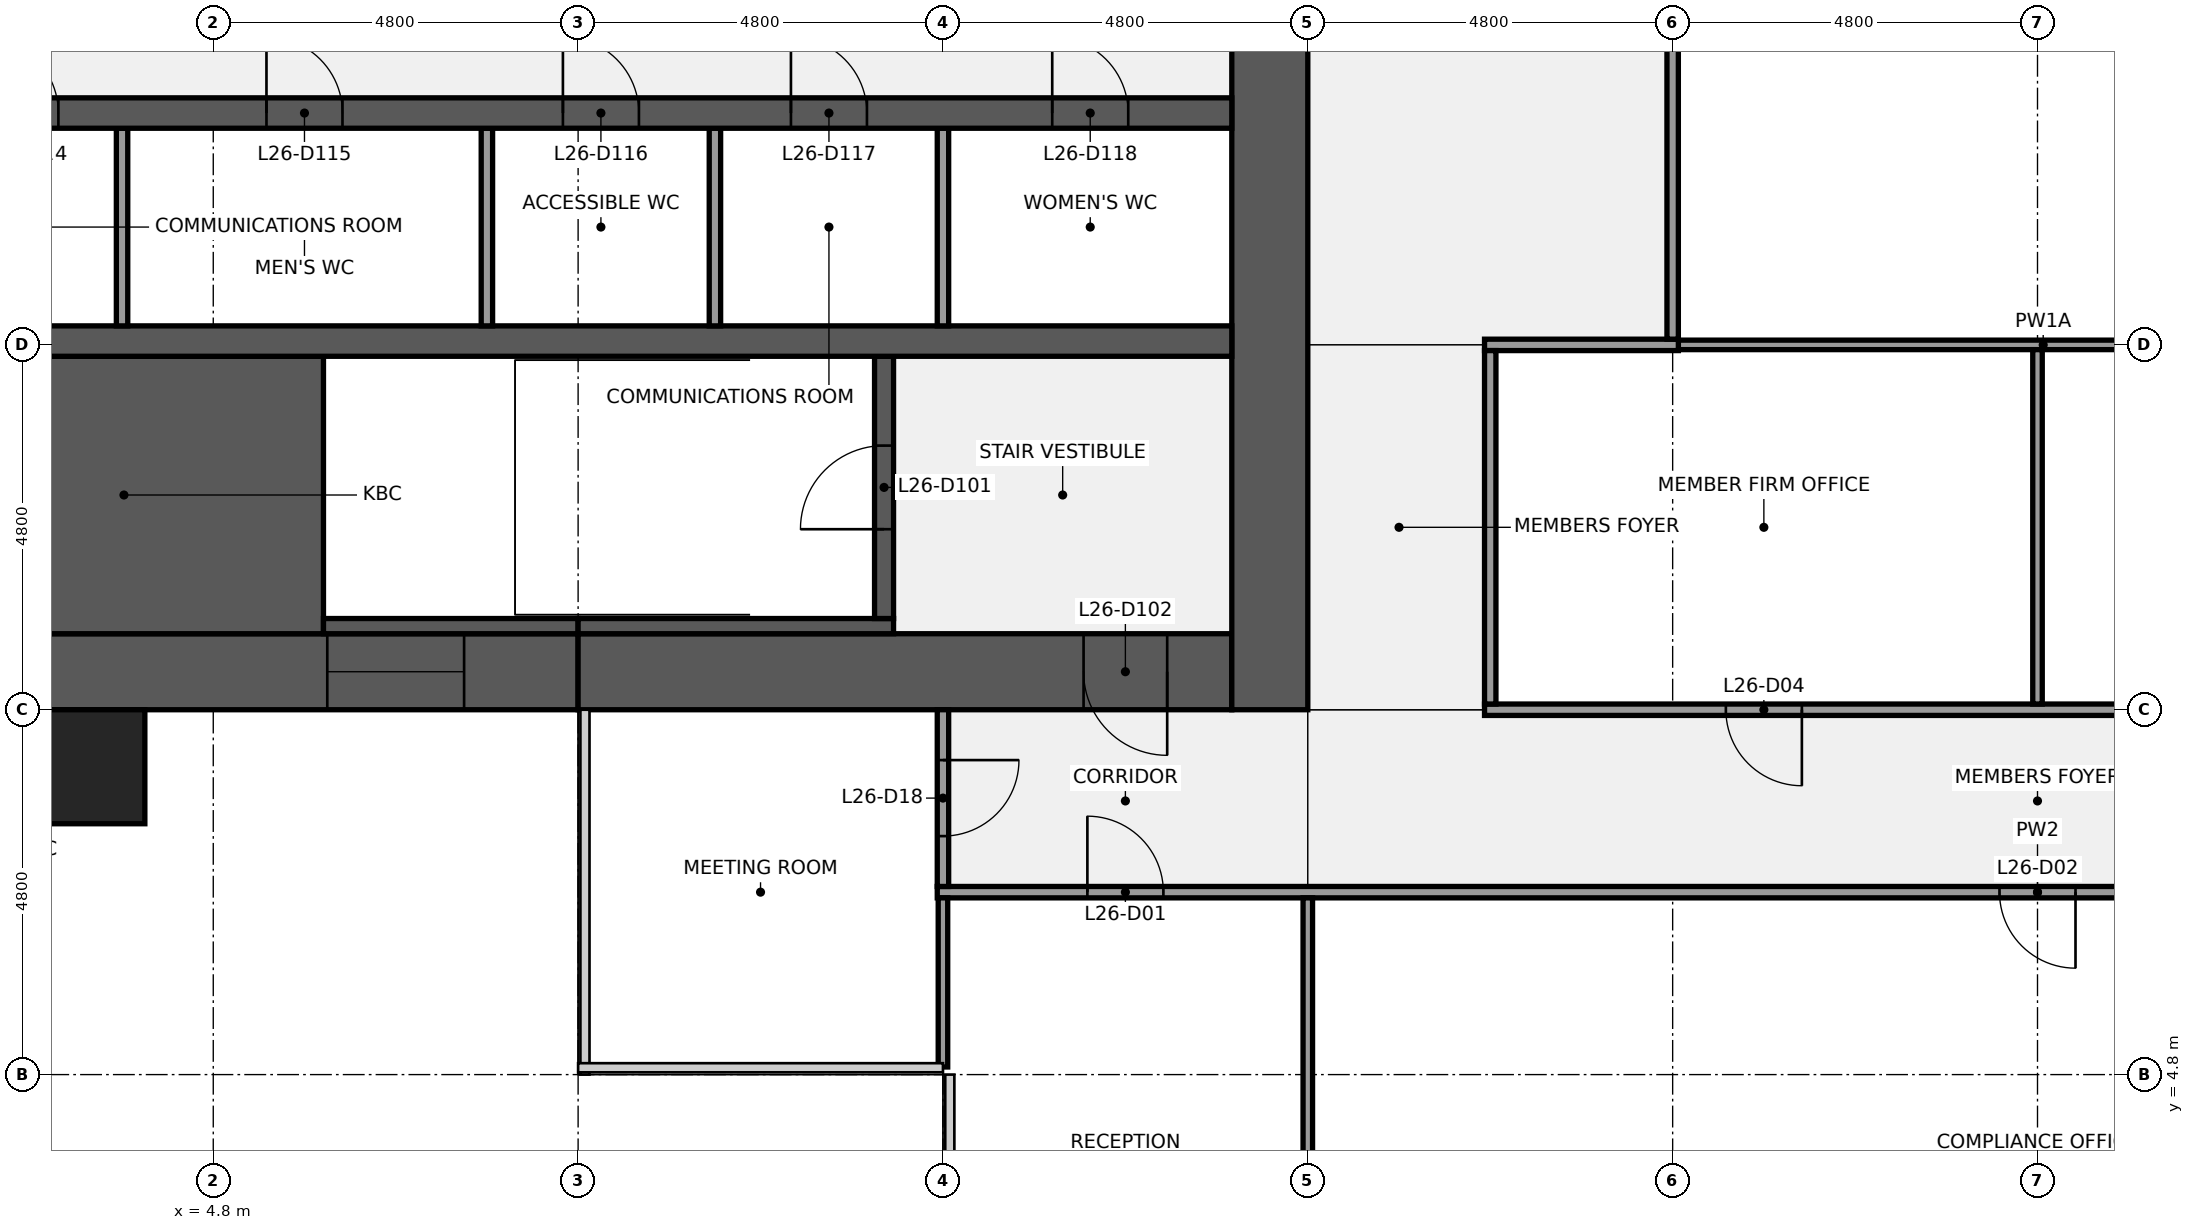
"""IFC4 building model, lengths in metres.
Left out: names, types, materials, properties, quantities, classifications, styles, units other than length and angle.
Written with IfcOpenShell. Run it as: python <this file> out.ifc"""

import sys

from ifc_helpers import new_model, si_unit, direction, frame, frame_2d, origin, origin_2d, place, context, subcontext, project, spatial, rectangle, extrude, element, fill, save


model = new_model("IFC4")
c1 = context("Model", 3, precision=1e-05, world=origin(), true_north=direction((0.0, 1.0)))
c2 = subcontext(c1, "Body", "Model", "MODEL_VIEW")
j1 = project(units=[si_unit("LENGTHUNIT", "METRE"), si_unit("PLANEANGLEUNIT", "RADIAN")], contexts=[c1])
p1 = place(None, origin())
s1 = spatial("IfcSite", under=j1, at=p1, CompositionType="ELEMENT")
p2 = place(p1, origin())
s2 = spatial("IfcBuilding", under=s1, at=p2, CompositionType="ELEMENT")
p3 = place(p2, frame((0.0, 0.0, 124.1)))
s3 = spatial("IfcBuildingStorey", under=s2, at=p3, CompositionType="ELEMENT", Elevation=124.1)
p4 = place(p3, frame((9.6, 10.1, 0.0), z_axis=(0.0, 0.0, 1.0), x_axis=(-1.0, 0.0, 0.0)))
e1 = element("IfcWall", 1, at=p4, inside=s3, PredefinedType="SHEAR", context=c2, shape_type="SweptSolid", body=[
    extrude(rectangle(XDim=8.6, YDim=1.0, at=frame_2d((4.3, 0.0))), origin(), (0.0, 0.0, 1.0), 3.84),
])
p5 = place(p4, frame((1.5, 0.0, 0.9)))
e2 = element("IfcOpeningElement", 2, at=p5, cuts=e1, PredefinedType="OPENING", context=c2, shape_type="SweptSolid", body=[
    extrude(rectangle(XDim=1.8, YDim=1.5, at=frame_2d((0.9, 0.75))), frame((0.0, 0.51, 0.0), z_axis=(0.0, -1.0, 0.0), x_axis=(1.0, 0.0, 0.0)), (0.0, 0.0, 1.0), 1.02),
])
p6 = place(p3, frame((18.2, 10.1, 0.0), z_axis=(0.0, 0.0, 1.0), x_axis=(-1.0, 0.0, 0.0)))
e3 = element("IfcWall", 3, at=p6, inside=s3, PredefinedType="SHEAR", context=c2, shape_type="SweptSolid", body=[
    extrude(rectangle(XDim=8.6, YDim=1.0, at=frame_2d((4.3, 0.0))), origin(), (0.0, 0.0, 1.0), 3.84),
])
p7 = place(p6, frame((0.85, 0.0, 0.0)))
e4 = element("IfcOpeningElement", 4, at=p7, cuts=e3, PredefinedType="OPENING", context=c2, shape_type="SweptSolid", body=[
    extrude(rectangle(XDim=1.1, YDim=2.1, at=frame_2d((0.55, 1.05))), frame((0.0, 0.51, 0.0), z_axis=(0.0, -1.0, 0.0), x_axis=(1.0, 0.0, 0.0)), (0.0, 0.0, 1.0), 1.02),
])
p8 = place(p3, frame((18.7, 38.4, 0.0), z_axis=(0.0, 0.0, 1.0), x_axis=(0.0, -1.0, 0.0)))
e5 = element("IfcWall", 5, at=p8, inside=s3, PredefinedType="SHEAR", context=c2, shape_type="SweptSolid", body=[
    extrude(rectangle(XDim=28.8, YDim=1.0, at=frame_2d((14.4, 0.0))), origin(), (0.0, 0.0, 1.0), 3.84),
])
p9 = place(p8, frame((18.3, 0.0, 0.0)))
e6 = element("IfcOpeningElement", 6, at=p9, cuts=e5, PredefinedType="OPENING", context=c2, shape_type="SweptSolid", body=[
    extrude(rectangle(XDim=1.8, YDim=2.1, at=frame_2d((0.9, 1.05))), frame((0.0, 0.51, 0.0), z_axis=(0.0, -1.0, 0.0), x_axis=(1.0, 0.0, 0.0)), (0.0, 0.0, 1.0), 1.02),
])
p10 = place(p8, frame((8.7, 0.0, 0.0)))
e7 = element("IfcOpeningElement", 7, at=p10, cuts=e5, PredefinedType="OPENING", context=c2, shape_type="SweptSolid", body=[
    extrude(rectangle(XDim=1.8, YDim=2.1, at=frame_2d((0.9, 1.05))), frame((0.0, 0.51, 0.0), z_axis=(0.0, -1.0, 0.0), x_axis=(1.0, 0.0, 0.0)), (0.0, 0.0, 1.0), 1.02),
])
p11 = place(p3, frame((1.0, 12.425, 0.0), z_axis=(0.0, 0.0, 1.0), x_axis=(1.0, 0.0, 0.0)))
e8 = element("IfcWall", 8, at=p11, inside=s3, PredefinedType="SHEAR", context=c2, shape_type="SweptSolid", body=[
    extrude(rectangle(XDim=5.25, YDim=3.65, at=frame_2d((2.625, 0.0))), origin(), (0.0, 0.0, 1.0), 3.84),
])
p12 = place(p3, frame((6.25, 10.7, 0.0), z_axis=(0.0, 0.0, 1.0), x_axis=(1.0, 0.0, 0.0)))
e9 = element("IfcWall", 9, at=p12, inside=s3, PredefinedType="SHEAR", context=c2, shape_type="SweptSolid", body=[
    extrude(rectangle(XDim=3.35, YDim=0.2, at=frame_2d((1.675, 0.0))), origin(), (0.0, 0.0, 1.0), 3.84),
])
p13 = place(p3, frame((9.6, 10.7, 0.0), z_axis=(0.0, 0.0, 1.0), x_axis=(1.0, 0.0, 0.0)))
e10 = element("IfcWall", 10, at=p13, inside=s3, PredefinedType="SHEAR", context=c2, shape_type="SweptSolid", body=[
    extrude(rectangle(XDim=4.15, YDim=0.2, at=frame_2d((2.075, 0.0))), origin(), (0.0, 0.0, 1.0), 3.84),
])
p14 = place(p3, frame((13.625, 10.8, 0.0), z_axis=(0.0, 0.0, 1.0), x_axis=(0.0, 1.0, 0.0)))
e11 = element("IfcWall", 11, at=p14, inside=s3, PredefinedType="SHEAR", context=c2, shape_type="SweptSolid", body=[
    extrude(rectangle(XDim=3.45, YDim=0.25, at=frame_2d((1.725, 0.0))), origin(), (0.0, 0.0, 1.0), 3.84),
])
p15 = place(p14, frame((1.175, 0.0, 0.0)))
e12 = element("IfcOpeningElement", 12, at=p15, cuts=e11, PredefinedType="OPENING", context=c2, shape_type="SweptSolid", body=[
    extrude(rectangle(XDim=1.1, YDim=2.1, at=frame_2d((0.55, 1.05))), frame((0.0, 0.135, 0.0), z_axis=(0.0, -1.0, 0.0), x_axis=(1.0, 0.0, 0.0)), (0.0, 0.0, 1.0), 0.27),
])
p16 = place(p3, frame((1.0, 14.45, 0.0), z_axis=(0.0, 0.0, 1.0), x_axis=(1.0, 0.0, 0.0)))
e13 = element("IfcWall", 13, at=p16, inside=s3, PredefinedType="SHEAR", context=c2, shape_type="SweptSolid", body=[
    extrude(rectangle(XDim=17.2, YDim=0.4, at=frame_2d((8.6, 0.0))), origin(), (0.0, 0.0, 1.0), 3.84),
])
for number, where, z_axis, x_axis in (
    (14, (3.6, 14.65, 0.0), (0.0, 0.0, 1.0), (0.0, 1.0, 0.0)),
    (15, (8.4, 14.65, 0.0), (0.0, 0.0, 1.0), (0.0, 1.0, 0.0)),
    (16, (11.4, 14.65, 0.0), (0.0, 0.0, 1.0), (0.0, 1.0, 0.0)),
    (17, (14.4, 14.65, 0.0), (0.0, 0.0, 1.0), (0.0, 1.0, 0.0)),
):
    element("IfcWall", number, at=place(p3, frame(where, z_axis=z_axis, x_axis=x_axis)), inside=s3, PredefinedType="PARTITIONING", context=c2, shape_type="SweptSolid", body=[
        extrude(rectangle(XDim=2.6, YDim=0.15, at=frame_2d((1.3, 0.0))), origin(), (0.0, 0.0, 1.0), 3.84),
    ])
p17 = place(p3, frame((1.0, 17.45, 0.0), z_axis=(0.0, 0.0, 1.0), x_axis=(1.0, 0.0, 0.0)))
e18 = element("IfcWall", 18, at=p17, inside=s3, PredefinedType="SHEAR", context=c2, shape_type="SweptSolid", body=[
    extrude(rectangle(XDim=17.2, YDim=0.4, at=frame_2d((8.6, 0.0))), origin(), (0.0, 0.0, 1.0), 3.84),
])
p18 = place(p17, frame((0.762, 0.0, 0.0)))
e19 = element("IfcOpeningElement", 19, at=p18, cuts=e18, PredefinedType="OPENING", context=c2, shape_type="SweptSolid", body=[
    extrude(rectangle(XDim=1.0, YDim=2.1, at=frame_2d((0.5, 1.05))), frame((0.0, 0.21, 0.0), z_axis=(0.0, -1.0, 0.0), x_axis=(1.0, 0.0, 0.0)), (0.0, 0.0, 1.0), 0.42),
])
p19 = place(p17, frame((4.5, 0.0, 0.0)))
e20 = element("IfcOpeningElement", 20, at=p19, cuts=e18, PredefinedType="OPENING", context=c2, shape_type="SweptSolid", body=[
    extrude(rectangle(XDim=1.0, YDim=2.1, at=frame_2d((0.5, 1.05))), frame((0.0, 0.21, 0.0), z_axis=(0.0, -1.0, 0.0), x_axis=(1.0, 0.0, 0.0)), (0.0, 0.0, 1.0), 0.42),
])
p20 = place(p17, frame((8.4, 0.0, 0.0)))
e21 = element("IfcOpeningElement", 21, at=p20, cuts=e18, PredefinedType="OPENING", context=c2, shape_type="SweptSolid", body=[
    extrude(rectangle(XDim=1.0, YDim=2.1, at=frame_2d((0.5, 1.05))), frame((0.0, 0.21, 0.0), z_axis=(0.0, -1.0, 0.0), x_axis=(1.0, 0.0, 0.0)), (0.0, 0.0, 1.0), 0.42),
])
p21 = place(p17, frame((11.4, 0.0, 0.0)))
e22 = element("IfcOpeningElement", 22, at=p21, cuts=e18, PredefinedType="OPENING", context=c2, shape_type="SweptSolid", body=[
    extrude(rectangle(XDim=1.0, YDim=2.1, at=frame_2d((0.5, 1.05))), frame((0.0, 0.21, 0.0), z_axis=(0.0, -1.0, 0.0), x_axis=(1.0, 0.0, 0.0)), (0.0, 0.0, 1.0), 0.42),
])
p22 = place(p17, frame((14.837, 0.0, 0.0)))
e23 = element("IfcOpeningElement", 23, at=p22, cuts=e18, PredefinedType="OPENING", context=c2, shape_type="SweptSolid", body=[
    extrude(rectangle(XDim=1.0, YDim=2.1, at=frame_2d((0.5, 1.05))), frame((0.0, 0.21, 0.0), z_axis=(0.0, -1.0, 0.0), x_axis=(1.0, 0.0, 0.0)), (0.0, 0.0, 1.0), 0.42),
])
p23 = place(p3, frame((14.325, 7.2, 0.0), z_axis=(0.0, 0.0, 1.0), x_axis=(1.0, 0.0, 0.0)))
e24 = element("IfcWall", 24, at=p23, inside=s3, PredefinedType="PARTITIONING", context=c2, shape_type="SweptSolid", body=[
    extrude(rectangle(XDim=28.95, YDim=0.15, at=frame_2d((14.475, 0.0))), origin(), (0.0, 0.0, 1.0), 2.849),
])
p24 = place(p23, frame((1.975, 0.0, 0.0)))
e25 = element("IfcOpeningElement", 25, at=p24, cuts=e24, PredefinedType="OPENING", context=c2, shape_type="SweptSolid", body=[
    extrude(rectangle(XDim=1.0, YDim=2.1, at=frame_2d((0.5, 1.05))), frame((0.0, 0.085, 0.0), z_axis=(0.0, -1.0, 0.0), x_axis=(1.0, 0.0, 0.0)), (0.0, 0.0, 1.0), 0.17),
])
p25 = place(p23, frame((13.975, 0.0, 0.0)))
e26 = element("IfcOpeningElement", 26, at=p25, cuts=e24, PredefinedType="OPENING", context=c2, shape_type="SweptSolid", body=[
    extrude(rectangle(XDim=1.0, YDim=2.1, at=frame_2d((0.5, 1.05))), frame((0.0, 0.085, 0.0), z_axis=(0.0, -1.0, 0.0), x_axis=(1.0, 0.0, 0.0)), (0.0, 0.0, 1.0), 0.17),
])
p26 = place(p23, frame((25.975, 0.0, 0.0)))
e27 = element("IfcOpeningElement", 27, at=p26, cuts=e24, PredefinedType="OPENING", context=c2, shape_type="SweptSolid", body=[
    extrude(rectangle(XDim=1.0, YDim=2.1, at=frame_2d((0.5, 1.05))), frame((0.0, 0.085, 0.0), z_axis=(0.0, -1.0, 0.0), x_axis=(1.0, 0.0, 0.0)), (0.0, 0.0, 1.0), 0.17),
])
p27 = place(p3, frame((21.525, 9.6, 0.0), z_axis=(0.0, 0.0, 1.0), x_axis=(1.0, 0.0, 0.0)))
e28 = element("IfcWall", 28, at=p27, inside=s3, PredefinedType="PARTITIONING", context=c2, shape_type="SweptSolid", body=[
    extrude(rectangle(XDim=14.55, YDim=0.15, at=frame_2d((7.275, 0.0))), origin(), (0.0, 0.0, 1.0), 2.849),
])
p28 = place(p27, frame((3.175, 0.0, 0.0)))
e29 = element("IfcOpeningElement", 29, at=p28, cuts=e28, PredefinedType="OPENING", context=c2, shape_type="SweptSolid", body=[
    extrude(rectangle(XDim=1.0, YDim=2.1, at=frame_2d((0.5, 1.05))), frame((0.0, 0.085, 0.0), z_axis=(0.0, -1.0, 0.0), x_axis=(1.0, 0.0, 0.0)), (0.0, 0.0, 1.0), 0.17),
])
p29 = place(p27, frame((10.375, 0.0, 0.0)))
e30 = element("IfcOpeningElement", 30, at=p29, cuts=e28, PredefinedType="OPENING", context=c2, shape_type="SweptSolid", body=[
    extrude(rectangle(XDim=1.0, YDim=2.1, at=frame_2d((0.5, 1.05))), frame((0.0, 0.085, 0.0), z_axis=(0.0, -1.0, 0.0), x_axis=(1.0, 0.0, 0.0)), (0.0, 0.0, 1.0), 0.17),
])
p30 = place(p3, frame((24.075, 14.4, 0.0), z_axis=(0.0, 0.0, 1.0), x_axis=(1.0, 0.0, 0.0)))
e31 = element("IfcWall", 31, at=p30, inside=s3, PredefinedType="PARTITIONING", context=c2, shape_type="SweptSolid", body=[
    extrude(rectangle(XDim=9.6, YDim=0.125, at=frame_2d((4.8, 0.0))), origin(), (0.0, 0.0, 1.0), 2.849),
])
p31 = place(p3, frame((21.525, 14.4, 0.0), z_axis=(0.0, 0.0, 1.0), x_axis=(1.0, 0.0, 0.0)))
e32 = element("IfcWall", 32, at=p31, inside=s3, PredefinedType="PARTITIONING", context=c2, shape_type="SweptSolid", body=[
    extrude(rectangle(XDim=2.55, YDim=0.15, at=frame_2d((1.275, 0.0))), origin(), (0.0, 0.0, 1.0), 2.849),
])
p32 = place(p3, frame((14.4, 4.9, 0.0), z_axis=(0.0, 0.0, 1.0), x_axis=(0.0, 1.0, 0.0)))
e33 = element("IfcWall", 33, at=p32, inside=s3, PredefinedType="PARTITIONING", context=c2, shape_type="SweptSolid", body=[
    extrude(rectangle(XDim=2.225, YDim=0.125, at=frame_2d((1.113, 0.0))), origin(), (0.0, 0.0, 1.0), 2.849),
])
p33 = place(p3, frame((14.4, 7.275, 0.0), z_axis=(0.0, 0.0, 1.0), x_axis=(0.0, 1.0, 0.0)))
e34 = element("IfcWall", 34, at=p33, inside=s3, PredefinedType="PARTITIONING", context=c2, shape_type="SweptSolid", body=[
    extrude(rectangle(XDim=2.325, YDim=0.15, at=frame_2d((1.163, 0.0))), origin(), (0.0, 0.0, 1.0), 2.849),
])
p34 = place(p33, frame((0.663, 0.0, 0.0)))
e35 = element("IfcOpeningElement", 35, at=p34, cuts=e34, PredefinedType="OPENING", context=c2, shape_type="SweptSolid", body=[
    extrude(rectangle(XDim=1.0, YDim=2.1, at=frame_2d((0.5, 1.05))), frame((0.0, 0.085, 0.0), z_axis=(0.0, -1.0, 0.0), x_axis=(1.0, 0.0, 0.0)), (0.0, 0.0, 1.0), 0.17),
])
p35 = place(p3, frame((19.2, 0.6, 0.0), z_axis=(0.0, 0.0, 1.0), x_axis=(0.0, 1.0, 0.0)))
e36 = element("IfcWall", 36, at=p35, inside=s3, PredefinedType="PARTITIONING", context=c2, shape_type="SweptSolid", body=[
    extrude(rectangle(XDim=6.525, YDim=0.125, at=frame_2d((3.262, 0.0))), origin(), (0.0, 0.0, 1.0), 2.849),
])
p36 = place(p3, frame((21.6, 9.675, 0.0), z_axis=(0.0, 0.0, 1.0), x_axis=(0.0, 1.0, 0.0)))
e37 = element("IfcWall", 37, at=p36, inside=s3, PredefinedType="PARTITIONING", context=c2, shape_type="SweptSolid", body=[
    extrude(rectangle(XDim=4.65, YDim=0.15, at=frame_2d((2.325, 0.0))), origin(), (0.0, 0.0, 1.0), 2.849),
])
p37 = place(p3, frame((24.0, 14.475, 0.0), z_axis=(0.0, 0.0, 1.0), x_axis=(0.0, 1.0, 0.0)))
e38 = element("IfcWall", 38, at=p37, inside=s3, PredefinedType="PARTITIONING", context=c2, shape_type="SweptSolid", body=[
    extrude(rectangle(XDim=8.25, YDim=0.15, at=frame_2d((4.125, 0.0))), origin(), (0.0, 0.0, 1.0), 2.849),
])
p38 = place(p3, frame((28.8, 9.675, 0.0), z_axis=(0.0, 0.0, 1.0), x_axis=(0.0, 1.0, 0.0)))
e39 = element("IfcWall", 39, at=p38, inside=s3, PredefinedType="PARTITIONING", context=c2, shape_type="SweptSolid", body=[
    extrude(rectangle(XDim=4.662, YDim=0.125, at=frame_2d((2.331, 0.0))), origin(), (0.0, 0.0, 1.0), 2.849),
])
p39 = place(p3, frame((2.4, 8.85, 0.0), z_axis=(0.0, 0.0, 1.0), x_axis=(1.0, 0.0, 0.0)))
e40 = element("IfcColumn", 40, at=p39, inside=s3, PredefinedType="PILASTER", context=c2, shape_type="SweptSolid", body=[
    extrude(rectangle(XDim=3.0, YDim=1.5, at=origin_2d()), origin(), (0.0, 0.0, 1.0), 4.0),
])
p40 = place(p15, origin())
e41 = element("IfcDoor", 41, at=p40, inside=s3, OperationType="SINGLE_SWING_LEFT", PredefinedType="DOOR", context=c2, shape_type="SweptSolid", body=[
    extrude(rectangle(XDim=1.1, YDim=2.1, at=frame_2d((0.55, 1.05))), frame((0.0, 0.025, 0.0), z_axis=(0.0, -1.0, 0.0), x_axis=(1.0, 0.0, 0.0)), (0.0, 0.0, 1.0), 0.05),
])
fill(e12, e41)
p41 = place(p7, origin())
e42 = element("IfcDoor", 42, at=p41, inside=s3, OperationType="SINGLE_SWING_LEFT", PredefinedType="DOOR", context=c2, shape_type="SweptSolid", body=[
    extrude(rectangle(XDim=1.1, YDim=2.1, at=frame_2d((0.55, 1.05))), frame((0.0, 0.025, 0.0), z_axis=(0.0, -1.0, 0.0), x_axis=(1.0, 0.0, 0.0)), (0.0, 0.0, 1.0), 0.05),
])
fill(e4, e42)
p42 = place(p18, origin())
e43 = element("IfcDoor", 43, at=p42, inside=s3, OperationType="SINGLE_SWING_LEFT", PredefinedType="DOOR", context=c2, shape_type="SweptSolid", body=[
    extrude(rectangle(XDim=1.0, YDim=2.1, at=frame_2d((0.5, 1.05))), frame((0.0, 0.025, 0.0), z_axis=(0.0, -1.0, 0.0), x_axis=(1.0, 0.0, 0.0)), (0.0, 0.0, 1.0), 0.05),
])
fill(e19, e43)
p43 = place(p19, origin())
e44 = element("IfcDoor", 44, at=p43, inside=s3, OperationType="SINGLE_SWING_LEFT", PredefinedType="DOOR", context=c2, shape_type="SweptSolid", body=[
    extrude(rectangle(XDim=1.0, YDim=2.1, at=frame_2d((0.5, 1.05))), frame((0.0, 0.025, 0.0), z_axis=(0.0, -1.0, 0.0), x_axis=(1.0, 0.0, 0.0)), (0.0, 0.0, 1.0), 0.05),
])
fill(e20, e44)
p44 = place(p20, origin())
e45 = element("IfcDoor", 45, at=p44, inside=s3, OperationType="SINGLE_SWING_LEFT", PredefinedType="DOOR", context=c2, shape_type="SweptSolid", body=[
    extrude(rectangle(XDim=1.0, YDim=2.1, at=frame_2d((0.5, 1.05))), frame((0.0, 0.025, 0.0), z_axis=(0.0, -1.0, 0.0), x_axis=(1.0, 0.0, 0.0)), (0.0, 0.0, 1.0), 0.05),
])
fill(e21, e45)
p45 = place(p21, origin())
e46 = element("IfcDoor", 46, at=p45, inside=s3, OperationType="SINGLE_SWING_LEFT", PredefinedType="DOOR", context=c2, shape_type="SweptSolid", body=[
    extrude(rectangle(XDim=1.0, YDim=2.1, at=frame_2d((0.5, 1.05))), frame((0.0, 0.025, 0.0), z_axis=(0.0, -1.0, 0.0), x_axis=(1.0, 0.0, 0.0)), (0.0, 0.0, 1.0), 0.05),
])
fill(e22, e46)
p46 = place(p22, origin())
e47 = element("IfcDoor", 47, at=p46, inside=s3, OperationType="SINGLE_SWING_LEFT", PredefinedType="DOOR", context=c2, shape_type="SweptSolid", body=[
    extrude(rectangle(XDim=1.0, YDim=2.1, at=frame_2d((0.5, 1.05))), frame((0.0, 0.025, 0.0), z_axis=(0.0, -1.0, 0.0), x_axis=(1.0, 0.0, 0.0)), (0.0, 0.0, 1.0), 0.05),
])
fill(e23, e47)
p47 = place(p5, origin())
e48 = element("IfcWindow", 48, at=p47, inside=s3, PartitioningType="SINGLE_PANEL", PredefinedType="WINDOW", context=c2, shape_type="SweptSolid", body=[
    extrude(rectangle(XDim=1.8, YDim=1.5, at=frame_2d((0.9, 0.75))), frame((0.0, 0.03, 0.0), z_axis=(0.0, -1.0, 0.0), x_axis=(1.0, 0.0, 0.0)), (0.0, 0.0, 1.0), 0.06),
])
fill(e2, e48)
p48 = place(p24, origin())
e49 = element("IfcDoor", 49, at=p48, inside=s3, OperationType="SINGLE_SWING_LEFT", PredefinedType="DOOR", context=c2, shape_type="SweptSolid", body=[
    extrude(rectangle(XDim=1.0, YDim=2.1, at=frame_2d((0.5, 1.05))), frame((0.0, 0.025, 0.0), z_axis=(0.0, -1.0, 0.0), x_axis=(1.0, 0.0, 0.0)), (0.0, 0.0, 1.0), 0.05),
])
fill(e25, e49)
p49 = place(p25, origin())
e50 = element("IfcDoor", 50, at=p49, inside=s3, OperationType="SINGLE_SWING_RIGHT", PredefinedType="DOOR", context=c2, shape_type="SweptSolid", body=[
    extrude(rectangle(XDim=1.0, YDim=2.1, at=frame_2d((0.5, 1.05))), frame((0.0, 0.025, 0.0), z_axis=(0.0, -1.0, 0.0), x_axis=(1.0, 0.0, 0.0)), (0.0, 0.0, 1.0), 0.05),
])
fill(e26, e50)
p50 = place(p28, origin())
e51 = element("IfcDoor", 51, at=p50, inside=s3, OperationType="SINGLE_SWING_RIGHT", PredefinedType="DOOR", context=c2, shape_type="SweptSolid", body=[
    extrude(rectangle(XDim=1.0, YDim=2.1, at=frame_2d((0.5, 1.05))), frame((0.0, 0.025, 0.0), z_axis=(0.0, -1.0, 0.0), x_axis=(1.0, 0.0, 0.0)), (0.0, 0.0, 1.0), 0.05),
])
fill(e29, e51)
p51 = place(p34, origin())
e52 = element("IfcDoor", 52, at=p51, inside=s3, OperationType="SINGLE_SWING_RIGHT", PredefinedType="DOOR", context=c2, shape_type="SweptSolid", body=[
    extrude(rectangle(XDim=1.0, YDim=2.1, at=frame_2d((0.5, 1.05))), frame((0.0, 0.025, 0.0), z_axis=(0.0, -1.0, 0.0), x_axis=(1.0, 0.0, 0.0)), (0.0, 0.0, 1.0), 0.05),
])
fill(e35, e52)
save(model, sys.argv[1])
